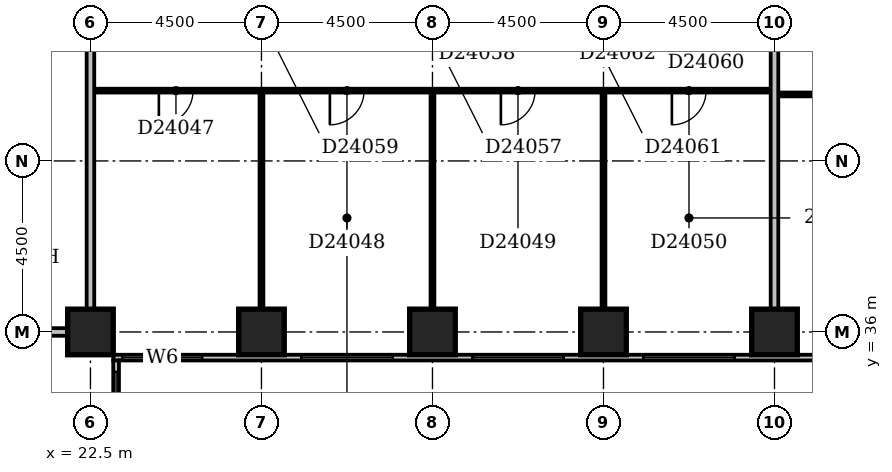
"""IFC4 building model, lengths in metres.
Left out: names, types, materials, properties, quantities, classifications, styles, units other than length and angle.
Written with IfcOpenShell. Run it as: python <this file> out.ifc"""

import sys

from ifc_helpers import new_model, si_unit, direction, frame, frame_2d, origin, origin_2d, place, context, subcontext, project, spatial, rectangle, extrude, element, fill, save


model = new_model("IFC4")
c1 = context("Model", 3, precision=1e-05, world=origin(), true_north=direction((0.0, 1.0)))
c2 = subcontext(c1, "Body", "Model", "MODEL_VIEW")
j1 = project(units=[si_unit("LENGTHUNIT", "METRE"), si_unit("PLANEANGLEUNIT", "RADIAN")], contexts=[c1])
p1 = place(None, origin())
s1 = spatial("IfcSite", under=j1, at=p1, CompositionType="ELEMENT")
p2 = place(p1, origin())
s2 = spatial("IfcBuilding", under=s1, at=p2, CompositionType="ELEMENT")
p3 = place(p2, frame((0.0, 0.0, 97.4)))
s3 = spatial("IfcBuildingStorey", under=s2, at=p3, CompositionType="ELEMENT", Elevation=97.4)
for number, where, z_axis, x_axis in (
    (1, (22.5, 36.0, -0.3), (0.0, 0.0, 1.0), (1.0, 0.0, 0.0)),
    (2, (27.0, 36.0, -0.3), (0.0, 0.0, 1.0), (1.0, 0.0, 0.0)),
    (3, (31.5, 36.0, -0.3), (0.0, 0.0, 1.0), (1.0, 0.0, 0.0)),
    (4, (36.0, 36.0, -0.3), (0.0, 0.0, 1.0), (1.0, 0.0, 0.0)),
    (5, (40.5, 36.0, -0.3), (0.0, 0.0, 1.0), (1.0, 0.0, 0.0)),
):
    element("IfcColumn", number, at=place(p3, frame(where, z_axis=z_axis, x_axis=x_axis)), inside=s3, PredefinedType="COLUMN", context=c2, shape_type="SweptSolid", body=[
        extrude(rectangle(XDim=1.2, YDim=1.2, at=origin_2d()), origin(), (0.0, 0.0, 1.0), 3.6),
    ])
p4 = place(p3, frame((23.175, 17.4, 0.0), z_axis=(0.0, 0.0, 1.0), x_axis=(0.0, 1.0, 0.0)))
e6 = element("IfcWall", 6, at=p4, inside=s3, PredefinedType="STANDARD", context=c2, shape_type="SweptSolid", body=[
    extrude(rectangle(XDim=17.85, YDim=0.15, at=frame_2d((8.925, 0.0))), origin(), (0.0, 0.0, 1.0), 2.7),
])
p5 = place(p4, frame((1.487, 0.0, 0.6)))
e7 = element("IfcOpeningElement", 7, at=p5, cuts=e6, PredefinedType="OPENING", context=c2, shape_type="SweptSolid", body=[
    extrude(rectangle(XDim=1.8, YDim=1.8, at=frame_2d((0.9, 0.9))), frame((0.0, 0.087, 0.0), z_axis=(0.0, -1.0, 0.0), x_axis=(1.0, 0.0, 0.0)), (0.0, 0.0, 1.0), 0.174),
])
p6 = place(p4, frame((6.15, 0.0, 0.6)))
e8 = element("IfcOpeningElement", 8, at=p6, cuts=e6, PredefinedType="OPENING", context=c2, shape_type="SweptSolid", body=[
    extrude(rectangle(XDim=2.4, YDim=1.8, at=frame_2d((1.2, 0.9))), frame((0.0, 0.087, 0.0), z_axis=(0.0, -1.0, 0.0), x_axis=(1.0, 0.0, 0.0)), (0.0, 0.0, 1.0), 0.174),
])
p7 = place(p4, frame((10.65, 0.0, 0.6)))
e9 = element("IfcOpeningElement", 9, at=p7, cuts=e6, PredefinedType="OPENING", context=c2, shape_type="SweptSolid", body=[
    extrude(rectangle(XDim=2.4, YDim=1.8, at=frame_2d((1.2, 0.9))), frame((0.0, 0.087, 0.0), z_axis=(0.0, -1.0, 0.0), x_axis=(1.0, 0.0, 0.0)), (0.0, 0.0, 1.0), 0.174),
])
p8 = place(p4, frame((15.15, 0.0, 0.6)))
e10 = element("IfcOpeningElement", 10, at=p8, cuts=e6, PredefinedType="OPENING", context=c2, shape_type="SweptSolid", body=[
    extrude(rectangle(XDim=2.4, YDim=1.8, at=frame_2d((1.2, 0.9))), frame((0.0, 0.087, 0.0), z_axis=(0.0, -1.0, 0.0), x_axis=(1.0, 0.0, 0.0)), (0.0, 0.0, 1.0), 0.174),
])
p9 = place(p3, frame((23.1, 35.325, 0.0), z_axis=(0.0, 0.0, 1.0), x_axis=(1.0, 0.0, 0.0)))
e11 = element("IfcWall", 11, at=p9, inside=s3, PredefinedType="STANDARD", context=c2, shape_type="SweptSolid", body=[
    extrude(rectangle(XDim=45.15, YDim=0.15, at=frame_2d((22.575, 0.0))), origin(), (0.0, 0.0, 1.0), 2.7),
])
p10 = place(p9, frame((0.238, 0.0, 0.6)))
e12 = element("IfcOpeningElement", 12, at=p10, cuts=e11, PredefinedType="OPENING", context=c2, shape_type="SweptSolid", body=[
    extrude(rectangle(XDim=2.1, YDim=1.8, at=frame_2d((1.05, 0.9))), frame((0.0, 0.087, 0.0), z_axis=(0.0, -1.0, 0.0), x_axis=(1.0, 0.0, 0.0)), (0.0, 0.0, 1.0), 0.174),
])
p11 = place(p9, frame((4.95, 0.0, 0.6)))
e13 = element("IfcOpeningElement", 13, at=p11, cuts=e11, PredefinedType="OPENING", context=c2, shape_type="SweptSolid", body=[
    extrude(rectangle(XDim=2.4, YDim=1.8, at=frame_2d((1.2, 0.9))), frame((0.0, 0.087, 0.0), z_axis=(0.0, -1.0, 0.0), x_axis=(1.0, 0.0, 0.0)), (0.0, 0.0, 1.0), 0.174),
])
p12 = place(p9, frame((9.45, 0.0, 0.6)))
e14 = element("IfcOpeningElement", 14, at=p12, cuts=e11, PredefinedType="OPENING", context=c2, shape_type="SweptSolid", body=[
    extrude(rectangle(XDim=2.4, YDim=1.8, at=frame_2d((1.2, 0.9))), frame((0.0, 0.087, 0.0), z_axis=(0.0, -1.0, 0.0), x_axis=(1.0, 0.0, 0.0)), (0.0, 0.0, 1.0), 0.174),
])
p13 = place(p9, frame((13.95, 0.0, 0.6)))
e15 = element("IfcOpeningElement", 15, at=p13, cuts=e11, PredefinedType="OPENING", context=c2, shape_type="SweptSolid", body=[
    extrude(rectangle(XDim=2.4, YDim=1.8, at=frame_2d((1.2, 0.9))), frame((0.0, 0.087, 0.0), z_axis=(0.0, -1.0, 0.0), x_axis=(1.0, 0.0, 0.0)), (0.0, 0.0, 1.0), 0.174),
])
p14 = place(p9, frame((18.45, 0.0, 0.6)))
e16 = element("IfcOpeningElement", 16, at=p14, cuts=e11, PredefinedType="OPENING", context=c2, shape_type="SweptSolid", body=[
    extrude(rectangle(XDim=2.4, YDim=1.8, at=frame_2d((1.2, 0.9))), frame((0.0, 0.087, 0.0), z_axis=(0.0, -1.0, 0.0), x_axis=(1.0, 0.0, 0.0)), (0.0, 0.0, 1.0), 0.174),
])
p15 = place(p9, frame((24.326, 0.0, 0.6)))
e17 = element("IfcOpeningElement", 17, at=p15, cuts=e11, PredefinedType="OPENING", context=c2, shape_type="SweptSolid", body=[
    extrude(rectangle(XDim=1.2, YDim=1.8, at=frame_2d((0.6, 0.9))), frame((0.0, 0.087, 0.0), z_axis=(0.0, -1.0, 0.0), x_axis=(1.0, 0.0, 0.0)), (0.0, 0.0, 1.0), 0.174),
])
p16 = place(p9, frame((27.227, 0.0, 0.6)))
e18 = element("IfcOpeningElement", 18, at=p16, cuts=e11, PredefinedType="OPENING", context=c2, shape_type="SweptSolid", body=[
    extrude(rectangle(XDim=2.1, YDim=1.8, at=frame_2d((1.05, 0.9))), frame((0.0, 0.087, 0.0), z_axis=(0.0, -1.0, 0.0), x_axis=(1.0, 0.0, 0.0)), (0.0, 0.0, 1.0), 0.174),
])
p17 = place(p9, frame((31.95, 0.0, 0.6)))
e19 = element("IfcOpeningElement", 19, at=p17, cuts=e11, PredefinedType="OPENING", context=c2, shape_type="SweptSolid", body=[
    extrude(rectangle(XDim=2.4, YDim=1.8, at=frame_2d((1.2, 0.9))), frame((0.0, 0.087, 0.0), z_axis=(0.0, -1.0, 0.0), x_axis=(1.0, 0.0, 0.0)), (0.0, 0.0, 1.0), 0.174),
])
p18 = place(p9, frame((36.45, 0.0, 0.6)))
e20 = element("IfcOpeningElement", 20, at=p18, cuts=e11, PredefinedType="OPENING", context=c2, shape_type="SweptSolid", body=[
    extrude(rectangle(XDim=2.4, YDim=1.8, at=frame_2d((1.2, 0.9))), frame((0.0, 0.087, 0.0), z_axis=(0.0, -1.0, 0.0), x_axis=(1.0, 0.0, 0.0)), (0.0, 0.0, 1.0), 0.174),
])
p19 = place(p9, frame((40.95, 0.0, 0.6)))
e21 = element("IfcOpeningElement", 21, at=p19, cuts=e11, PredefinedType="OPENING", context=c2, shape_type="SweptSolid", body=[
    extrude(rectangle(XDim=2.4, YDim=1.8, at=frame_2d((1.2, 0.9))), frame((0.0, 0.087, 0.0), z_axis=(0.0, -1.0, 0.0), x_axis=(1.0, 0.0, 0.0)), (0.0, 0.0, 1.0), 0.174),
])
p20 = place(p3, frame((9.1, 36.0, 0.0), z_axis=(0.0, 0.0, 1.0), x_axis=(1.0, 0.0, 0.0)))
e22 = element("IfcWall", 22, at=p20, inside=s3, PredefinedType="PARTITIONING", context=c2, shape_type="SweptSolid", body=[
    extrude(rectangle(XDim=12.8, YDim=0.2, at=frame_2d((6.4, 0.0))), origin(), (0.0, 0.0, 1.0), 2.4),
])
p21 = place(p3, frame((22.5, 36.6, 0.0), z_axis=(0.0, 0.0, 1.0), x_axis=(0.0, 1.0, 0.0)))
e23 = element("IfcWall", 23, at=p21, inside=s3, PredefinedType="PARTITIONING", context=c2, shape_type="SweptSolid", body=[
    extrude(rectangle(XDim=12.8, YDim=0.2, at=frame_2d((6.4, 0.0))), origin(), (0.0, 0.0, 1.0), 3.3),
])
p22 = place(p3, frame((27.0, 36.6, 0.0), z_axis=(0.0, 0.0, 1.0), x_axis=(0.0, 1.0, 0.0)))
e24 = element("IfcWall", 24, at=p22, inside=s3, PredefinedType="PARTITIONING", context=c2, shape_type="SweptSolid", body=[
    extrude(rectangle(XDim=5.7, YDim=0.1, at=frame_2d((2.85, 0.0))), origin(), (0.0, 0.0, 1.0), 2.6),
])
p23 = place(p3, frame((31.5, 36.6, 0.0), z_axis=(0.0, 0.0, 1.0), x_axis=(0.0, 1.0, 0.0)))
e25 = element("IfcWall", 25, at=p23, inside=s3, PredefinedType="PARTITIONING", context=c2, shape_type="SweptSolid", body=[
    extrude(rectangle(XDim=5.7, YDim=0.1, at=frame_2d((2.85, 0.0))), origin(), (0.0, 0.0, 1.0), 3.3),
])
p24 = place(p3, frame((36.0, 36.6, 0.0), z_axis=(0.0, 0.0, 1.0), x_axis=(0.0, 1.0, 0.0)))
e26 = element("IfcWall", 26, at=p24, inside=s3, PredefinedType="PARTITIONING", context=c2, shape_type="SweptSolid", body=[
    extrude(rectangle(XDim=5.7, YDim=0.1, at=frame_2d((2.85, 0.0))), origin(), (0.0, 0.0, 1.0), 2.4),
])
p25 = place(p3, frame((40.5, 36.6, 0.0), z_axis=(0.0, 0.0, 1.0), x_axis=(0.0, 1.0, 0.0)))
e27 = element("IfcWall", 27, at=p25, inside=s3, PredefinedType="PARTITIONING", context=c2, shape_type="SweptSolid", body=[
    extrude(rectangle(XDim=12.8, YDim=0.2, at=frame_2d((6.4, 0.0))), origin(), (0.0, 0.0, 1.0), 3.3),
])
p26 = place(p3, frame((40.6, 42.25, 0.0), z_axis=(0.0, 0.0, 1.0), x_axis=(1.0, 0.0, 0.0)))
e28 = element("IfcWall", 28, at=p26, inside=s3, PredefinedType="PARTITIONING", context=c2, shape_type="SweptSolid", body=[
    extrude(rectangle(XDim=17.8, YDim=0.1, at=frame_2d((8.9, 0.0))), origin(), (0.0, 0.0, 1.0), 3.3),
])
p27 = place(p26, frame((3.9, 0.0, 0.0)))
e29 = element("IfcOpeningElement", 29, at=p27, cuts=e28, PredefinedType="OPENING", context=c2, shape_type="SweptSolid", body=[
    extrude(rectangle(XDim=0.9, YDim=2.1, at=frame_2d((0.45, 1.05))), frame((0.0, 0.062, 0.0), z_axis=(0.0, -1.0, 0.0), x_axis=(1.0, 0.0, 0.0)), (0.0, 0.0, 1.0), 0.124),
])
p28 = place(p26, frame((10.7, 0.0, 0.0)))
e30 = element("IfcOpeningElement", 30, at=p28, cuts=e28, PredefinedType="OPENING", context=c2, shape_type="SweptSolid", body=[
    extrude(rectangle(XDim=0.9, YDim=2.1, at=frame_2d((0.45, 1.05))), frame((0.0, 0.062, 0.0), z_axis=(0.0, -1.0, 0.0), x_axis=(1.0, 0.0, 0.0)), (0.0, 0.0, 1.0), 0.124),
])
p29 = place(p26, frame((14.05, 0.0, 0.0)))
e31 = element("IfcOpeningElement", 31, at=p29, cuts=e28, PredefinedType="OPENING", context=c2, shape_type="SweptSolid", body=[
    extrude(rectangle(XDim=0.9, YDim=2.1, at=frame_2d((0.45, 1.05))), frame((0.0, 0.062, 0.0), z_axis=(0.0, -1.0, 0.0), x_axis=(1.0, 0.0, 0.0)), (0.0, 0.0, 1.0), 0.124),
])
p30 = place(p3, frame((22.6, 42.35, 0.0), z_axis=(0.0, 0.0, 1.0), x_axis=(1.0, 0.0, 0.0)))
e32 = element("IfcWall", 32, at=p30, inside=s3, PredefinedType="PARTITIONING", context=c2, shape_type="SweptSolid", body=[
    extrude(rectangle(XDim=17.8, YDim=0.1, at=frame_2d((8.9, 0.0))), origin(), (0.0, 0.0, 1.0), 3.3),
])
p31 = place(p30, frame((1.7, 0.0, 0.0)))
e33 = element("IfcOpeningElement", 33, at=p31, cuts=e32, PredefinedType="OPENING", context=c2, shape_type="SweptSolid", body=[
    extrude(rectangle(XDim=0.9, YDim=2.1, at=frame_2d((0.45, 1.05))), frame((0.0, 0.062, 0.0), z_axis=(0.0, -1.0, 0.0), x_axis=(1.0, 0.0, 0.0)), (0.0, 0.0, 1.0), 0.124),
])
p32 = place(p30, frame((6.2, 0.0, 0.0)))
e34 = element("IfcOpeningElement", 34, at=p32, cuts=e32, PredefinedType="OPENING", context=c2, shape_type="SweptSolid", body=[
    extrude(rectangle(XDim=0.9, YDim=2.1, at=frame_2d((0.45, 1.05))), frame((0.0, 0.062, 0.0), z_axis=(0.0, -1.0, 0.0), x_axis=(1.0, 0.0, 0.0)), (0.0, 0.0, 1.0), 0.124),
])
p33 = place(p30, frame((10.7, 0.0, 0.0)))
e35 = element("IfcOpeningElement", 35, at=p33, cuts=e32, PredefinedType="OPENING", context=c2, shape_type="SweptSolid", body=[
    extrude(rectangle(XDim=0.9, YDim=2.1, at=frame_2d((0.45, 1.05))), frame((0.0, 0.062, 0.0), z_axis=(0.0, -1.0, 0.0), x_axis=(1.0, 0.0, 0.0)), (0.0, 0.0, 1.0), 0.124),
])
p34 = place(p30, frame((15.2, 0.0, 0.0)))
e36 = element("IfcOpeningElement", 36, at=p34, cuts=e32, PredefinedType="OPENING", context=c2, shape_type="SweptSolid", body=[
    extrude(rectangle(XDim=0.9, YDim=2.1, at=frame_2d((0.45, 1.05))), frame((0.0, 0.062, 0.0), z_axis=(0.0, -1.0, 0.0), x_axis=(1.0, 0.0, 0.0)), (0.0, 0.0, 1.0), 0.124),
])
p35 = place(p8, origin())
e37 = element("IfcWindow", 37, at=p35, inside=s3, PartitioningType="SINGLE_PANEL", PredefinedType="WINDOW", context=c2, shape_type="SweptSolid", body=[
    extrude(rectangle(XDim=2.4, YDim=1.8, at=frame_2d((1.2, 0.9))), frame((0.0, 0.03, 0.0), z_axis=(0.0, -1.0, 0.0), x_axis=(1.0, 0.0, 0.0)), (0.0, 0.0, 1.0), 0.06),
])
fill(e10, e37)
p36 = place(p10, origin())
e38 = element("IfcWindow", 38, at=p36, inside=s3, PartitioningType="SINGLE_PANEL", PredefinedType="WINDOW", context=c2, shape_type="SweptSolid", body=[
    extrude(rectangle(XDim=2.1, YDim=1.8, at=frame_2d((1.05, 0.9))), frame((0.0, 0.03, 0.0), z_axis=(0.0, -1.0, 0.0), x_axis=(1.0, 0.0, 0.0)), (0.0, 0.0, 1.0), 0.06),
])
fill(e12, e38)
p37 = place(p11, origin())
e39 = element("IfcWindow", 39, at=p37, inside=s3, PartitioningType="SINGLE_PANEL", PredefinedType="WINDOW", context=c2, shape_type="SweptSolid", body=[
    extrude(rectangle(XDim=2.4, YDim=1.8, at=frame_2d((1.2, 0.9))), frame((0.0, 0.03, 0.0), z_axis=(0.0, -1.0, 0.0), x_axis=(1.0, 0.0, 0.0)), (0.0, 0.0, 1.0), 0.06),
])
fill(e13, e39)
p38 = place(p12, origin())
e40 = element("IfcWindow", 40, at=p38, inside=s3, PartitioningType="SINGLE_PANEL", PredefinedType="WINDOW", context=c2, shape_type="SweptSolid", body=[
    extrude(rectangle(XDim=2.4, YDim=1.8, at=frame_2d((1.2, 0.9))), frame((0.0, 0.03, 0.0), z_axis=(0.0, -1.0, 0.0), x_axis=(1.0, 0.0, 0.0)), (0.0, 0.0, 1.0), 0.06),
])
fill(e14, e40)
p39 = place(p13, origin())
e41 = element("IfcWindow", 41, at=p39, inside=s3, PartitioningType="SINGLE_PANEL", PredefinedType="WINDOW", context=c2, shape_type="SweptSolid", body=[
    extrude(rectangle(XDim=2.4, YDim=1.8, at=frame_2d((1.2, 0.9))), frame((0.0, 0.03, 0.0), z_axis=(0.0, -1.0, 0.0), x_axis=(1.0, 0.0, 0.0)), (0.0, 0.0, 1.0), 0.06),
])
fill(e15, e41)
p40 = place(p31, frame((0.9, 0.0, 0.0), z_axis=(0.0, 0.0, 1.0), x_axis=(-1.0, 0.0, 0.0)))
e42 = element("IfcDoor", 42, at=p40, inside=s3, OperationType="SINGLE_SWING_RIGHT", PredefinedType="DOOR", context=c2, shape_type="SweptSolid", body=[
    extrude(rectangle(XDim=0.9, YDim=2.1, at=frame_2d((0.45, 1.05))), frame((0.0, 0.025, 0.0), z_axis=(0.0, -1.0, 0.0), x_axis=(1.0, 0.0, 0.0)), (0.0, 0.0, 1.0), 0.05),
])
fill(e33, e42)
p41 = place(p32, frame((0.9, 0.0, 0.0), z_axis=(0.0, 0.0, 1.0), x_axis=(-1.0, 0.0, 0.0)))
e43 = element("IfcDoor", 43, at=p41, inside=s3, OperationType="SINGLE_SWING_RIGHT", PredefinedType="DOOR", context=c2, shape_type="SweptSolid", body=[
    extrude(rectangle(XDim=0.9, YDim=2.1, at=frame_2d((0.45, 1.05))), frame((0.0, 0.025, 0.0), z_axis=(0.0, -1.0, 0.0), x_axis=(1.0, 0.0, 0.0)), (0.0, 0.0, 1.0), 0.05),
])
fill(e34, e43)
p42 = place(p33, frame((0.9, 0.0, 0.0), z_axis=(0.0, 0.0, 1.0), x_axis=(-1.0, 0.0, 0.0)))
e44 = element("IfcDoor", 44, at=p42, inside=s3, OperationType="SINGLE_SWING_RIGHT", PredefinedType="DOOR", context=c2, shape_type="SweptSolid", body=[
    extrude(rectangle(XDim=0.9, YDim=2.1, at=frame_2d((0.45, 1.05))), frame((0.0, 0.025, 0.0), z_axis=(0.0, -1.0, 0.0), x_axis=(1.0, 0.0, 0.0)), (0.0, 0.0, 1.0), 0.05),
])
fill(e35, e44)
p43 = place(p34, frame((0.9, 0.0, 0.0), z_axis=(0.0, 0.0, 1.0), x_axis=(-1.0, 0.0, 0.0)))
e45 = element("IfcDoor", 45, at=p43, inside=s3, OperationType="SINGLE_SWING_RIGHT", PredefinedType="DOOR", context=c2, shape_type="SweptSolid", body=[
    extrude(rectangle(XDim=0.9, YDim=2.1, at=frame_2d((0.45, 1.05))), frame((0.0, 0.025, 0.0), z_axis=(0.0, -1.0, 0.0), x_axis=(1.0, 0.0, 0.0)), (0.0, 0.0, 1.0), 0.05),
])
fill(e36, e45)
save(model, sys.argv[1])
